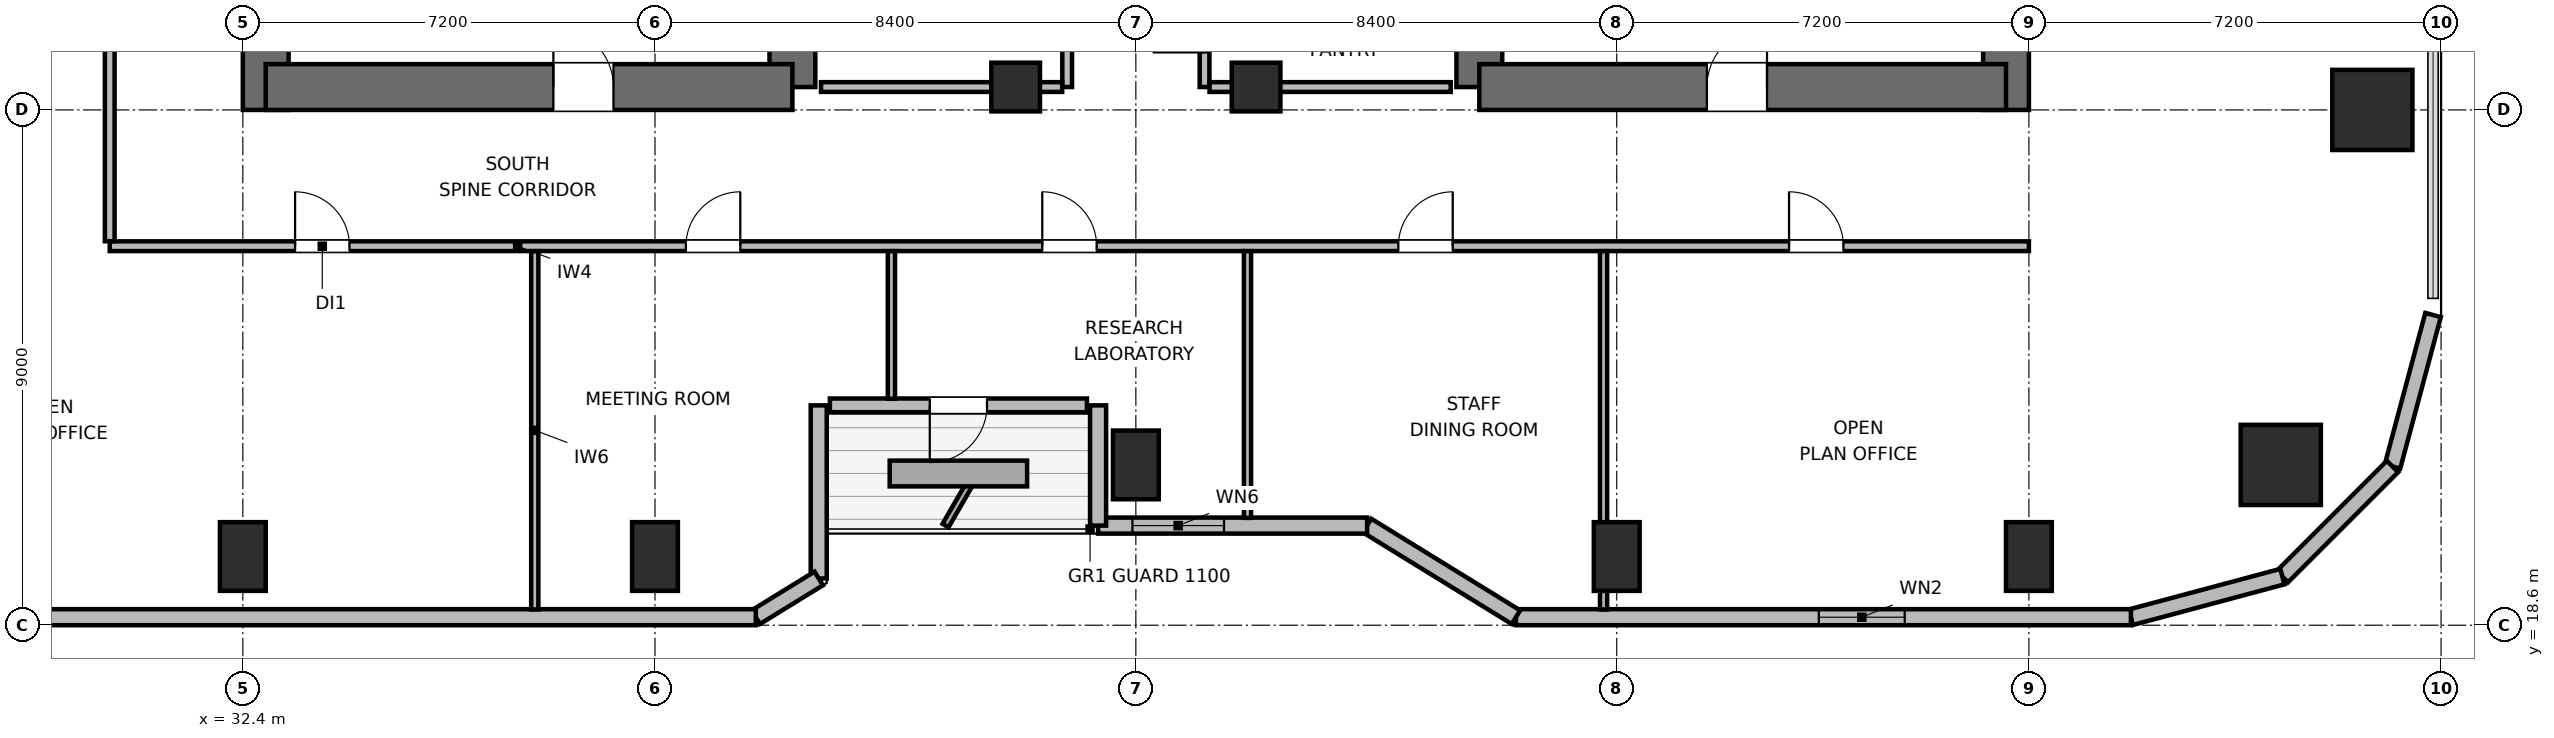
"""IFC4 building model, lengths in metres.
Left out: names, types, materials, properties, quantities, classifications, styles, units other than length and angle.
Written with IfcOpenShell. Run it as: python <this file> out.ifc"""

import sys

from ifc_helpers import new_model, si_unit, direction, frame, frame_2d, origin, origin_2d, place, context, subcontext, project, spatial, rectangle, circle, extrude, element, fill, save


model = new_model("IFC4")
c1 = context("Model", 3, precision=1e-05, world=origin(), true_north=direction((0.0, 1.0)))
c2 = subcontext(c1, "Body", "Model", "MODEL_VIEW")
j1 = project(units=[si_unit("LENGTHUNIT", "METRE"), si_unit("PLANEANGLEUNIT", "RADIAN")], contexts=[c1])
p1 = place(None, origin())
s1 = spatial("IfcSite", under=j1, at=p1, CompositionType="ELEMENT")
p2 = place(p1, origin())
s2 = spatial("IfcBuilding", under=s1, at=p2, CompositionType="ELEMENT")
p3 = place(p2, frame((0.0, 0.0, 150.6)))
s3 = spatial("IfcBuildingStorey", under=s2, at=p3, CompositionType="ELEMENT", Elevation=150.6)
p4 = place(p3, frame((32.8, 27.6, 0.0), z_axis=(0.0, 0.0, 1.0), x_axis=(0.0, 1.0, 0.0)))
e1 = element("IfcWall", 1, at=p4, inside=s3, PredefinedType="SHEAR", context=c2, shape_type="SweptSolid", body=[
    extrude(rectangle(XDim=16.8, YDim=0.8, at=frame_2d((8.4, 0.0))), origin(), (0.0, 0.0, 1.0), 3.9),
])
p5 = place(p3, frame((42.0, 28.0, 0.0), z_axis=(0.0, 0.0, 1.0), x_axis=(0.0, 1.0, 0.0)))
e2 = element("IfcWall", 2, at=p5, inside=s3, PredefinedType="SHEAR", context=c2, shape_type="SweptSolid", body=[
    extrude(rectangle(XDim=6.4, YDim=0.8, at=frame_2d((3.2, 0.0))), origin(), (0.0, 0.0, 1.0), 3.9),
])
p6 = place(p3, frame((32.8, 28.0, 0.0), z_axis=(0.0, 0.0, 1.0), x_axis=(1.0, 0.0, 0.0)))
e3 = element("IfcWall", 3, at=p6, inside=s3, PredefinedType="SHEAR", context=c2, shape_type="SweptSolid", body=[
    extrude(rectangle(XDim=9.2, YDim=0.8, at=frame_2d((4.6, 0.0))), origin(), (0.0, 0.0, 1.0), 3.9),
])
p7 = place(p6, frame((5.025, 0.0, 0.0)))
e4 = element("IfcOpeningElement", 4, at=p7, cuts=e3, PredefinedType="OPENING", context=c2, shape_type="SweptSolid", body=[
    extrude(rectangle(XDim=1.05, YDim=2.04, at=frame_2d((0.525, 1.02))), frame((0.0, 0.41, 0.0), z_axis=(0.0, -1.0, 0.0), x_axis=(1.0, 0.0, 0.0)), (0.0, 0.0, 1.0), 0.82),
])
p8 = place(p3, frame((54.0, 28.0, 0.0), z_axis=(0.0, 0.0, 1.0), x_axis=(0.0, 1.0, 0.0)))
e5 = element("IfcWall", 5, at=p8, inside=s3, PredefinedType="SHEAR", context=c2, shape_type="SweptSolid", body=[
    extrude(rectangle(XDim=7.8, YDim=0.8, at=frame_2d((3.9, 0.0))), origin(), (0.0, 0.0, 1.0), 3.9),
])
p9 = place(p3, frame((63.2, 27.6, 0.0), z_axis=(0.0, 0.0, 1.0), x_axis=(0.0, 1.0, 0.0)))
e6 = element("IfcWall", 6, at=p9, inside=s3, PredefinedType="SHEAR", context=c2, shape_type="SweptSolid", body=[
    extrude(rectangle(XDim=16.8, YDim=0.8, at=frame_2d((8.4, 0.0))), origin(), (0.0, 0.0, 1.0), 3.9),
])
p10 = place(p3, frame((54.0, 28.0, 0.0), z_axis=(0.0, 0.0, 1.0), x_axis=(1.0, 0.0, 0.0)))
e7 = element("IfcWall", 7, at=p10, inside=s3, PredefinedType="SHEAR", context=c2, shape_type="SweptSolid", body=[
    extrude(rectangle(XDim=9.2, YDim=0.8, at=frame_2d((4.6, 0.0))), origin(), (0.0, 0.0, 1.0), 3.9),
])
p11 = place(p10, frame((3.975, 0.0, 0.0)))
e8 = element("IfcOpeningElement", 8, at=p11, cuts=e7, PredefinedType="OPENING", context=c2, shape_type="SweptSolid", body=[
    extrude(rectangle(XDim=1.05, YDim=2.04, at=frame_2d((0.525, 1.02))), frame((0.0, 0.41, 0.0), z_axis=(0.0, -1.0, 0.0), x_axis=(1.0, 0.0, 0.0)), (0.0, 0.0, 1.0), 0.82),
])
p12 = place(p3, frame((68.0, 21.4, 0.0), z_axis=(0.0, 0.0, 1.0), x_axis=(1.0, 0.0, 0.0)))
e9 = element("IfcColumn", 9, at=p12, inside=s3, PredefinedType="COLUMN", context=c2, shape_type="SweptSolid", body=[
    extrude(circle(Radius=0.7, at=origin_2d()), origin(), (0.0, 0.0, 1.0), 3.9),
])
for number, where, z_axis, x_axis in (
    (10, (32.4, 19.8, 0.0), (0.0, 0.0, 1.0), (1.0, 0.0, 0.0)),
    (11, (39.6, 19.8, 0.0), (0.0, 0.0, 1.0), (1.0, 0.0, 0.0)),
    (12, (48.0, 21.4, 0.0), (0.0, 0.0, 1.0), (1.0, 0.0, 0.0)),
    (13, (56.4, 19.8, 0.0), (0.0, 0.0, 1.0), (1.0, 0.0, 0.0)),
    (14, (63.6, 19.8, 0.0), (0.0, 0.0, 1.0), (1.0, 0.0, 0.0)),
):
    element("IfcColumn", number, at=place(p3, frame(where, z_axis=z_axis, x_axis=x_axis)), inside=s3, PredefinedType="COLUMN", context=c2, shape_type="SweptSolid", body=[
        extrude(rectangle(XDim=0.8, YDim=1.2, at=origin_2d()), origin(), (0.0, 0.0, 1.0), 3.9),
    ])
p13 = place(p3, frame((69.6, 27.6, 0.0), z_axis=(0.0, 0.0, 1.0), x_axis=(1.0, 0.0, 0.0)))
e15 = element("IfcColumn", 15, at=p13, inside=s3, PredefinedType="COLUMN", context=c2, shape_type="SweptSolid", body=[
    extrude(rectangle(XDim=1.4, YDim=1.4, at=origin_2d()), origin(), (0.0, 0.0, 1.0), 3.9),
])
for number, where, z_axis, x_axis in (
    (16, (45.9, 28.0, 0.0), (0.0, 0.0, 1.0), (1.0, 0.0, 0.0)),
    (17, (50.1, 28.0, 0.0), (0.0, 0.0, 1.0), (1.0, 0.0, 0.0)),
):
    element("IfcColumn", number, at=place(p3, frame(where, z_axis=z_axis, x_axis=x_axis)), inside=s3, PredefinedType="COLUMN", context=c2, shape_type="SweptSolid", body=[
        extrude(rectangle(XDim=0.85, YDim=0.85, at=origin_2d()), origin(), (0.0, 0.0, 1.0), 3.9),
    ])
p14 = place(p3, frame((70.66, 24.018, 0.0), z_axis=(0.0, 0.0, 1.0), x_axis=(-0.258672222976, -0.9659651552, 0.0)))
e18 = element("IfcWall", 18, at=p14, inside=s3, PredefinedType="SOLIDWALL", context=c2, shape_type="SweptSolid", body=[
    extrude(rectangle(XDim=2.739, YDim=0.28, at=frame_2d((1.37, 0.0))), origin(), (0.0, 0.0, 1.0), 3.68),
])
p15 = place(p3, frame((69.951, 21.373, 0.0), z_axis=(0.0, 0.0, 1.0), x_axis=(-0.707061915429, -0.707151644098, 0.0)))
e19 = element("IfcWall", 19, at=p15, inside=s3, PredefinedType="SOLIDWALL", context=c2, shape_type="SweptSolid", body=[
    extrude(rectangle(XDim=2.721, YDim=0.28, at=frame_2d((1.36, 0.0))), origin(), (0.0, 0.0, 1.0), 3.68),
])
p16 = place(p3, frame((68.028, 19.448, 0.0), z_axis=(0.0, 0.0, 1.0), x_axis=(-0.965971118627, -0.258649952598, 0.0)))
e20 = element("IfcWall", 20, at=p16, inside=s3, PredefinedType="SOLIDWALL", context=c2, shape_type="SweptSolid", body=[
    extrude(rectangle(XDim=2.739, YDim=0.28, at=frame_2d((1.37, 0.0))), origin(), (0.0, 0.0, 1.0), 3.68),
])
p17 = place(p3, frame((65.382, 18.74, 0.0), z_axis=(0.0, 0.0, 1.0), x_axis=(-1.0, 0.0, 0.0)))
e21 = element("IfcWall", 21, at=p17, inside=s3, PredefinedType="SOLIDWALL", context=c2, shape_type="SweptSolid", body=[
    extrude(rectangle(XDim=10.742, YDim=0.28, at=frame_2d((5.371, 0.0))), origin(), (0.0, 0.0, 1.0), 3.68),
])
p18 = place(p17, frame((3.951, 0.0, 0.85)))
e22 = element("IfcOpeningElement", 22, at=p18, cuts=e21, PredefinedType="OPENING", context=c2, shape_type="SweptSolid", body=[
    extrude(rectangle(XDim=1.5, YDim=1.1, at=frame_2d((0.75, 0.55))), frame((0.0, 0.15, 0.0), z_axis=(0.0, -1.0, 0.0), x_axis=(1.0, 0.0, 0.0)), (0.0, 0.0, 1.0), 0.3),
])
p19 = place(p3, frame((54.64, 18.74, 0.0), z_axis=(0.0, 0.0, 1.0), x_axis=(-0.851652825334, 0.524106349037, 0.0)))
e23 = element("IfcWall", 23, at=p19, inside=s3, PredefinedType="SOLIDWALL", context=c2, shape_type="SweptSolid", body=[
    extrude(rectangle(XDim=3.053, YDim=0.28, at=frame_2d((1.526, 0.0))), origin(), (0.0, 0.0, 1.0), 2.265),
])
p20 = place(p3, frame((52.04, 20.34, 0.0), z_axis=(0.0, 0.0, 1.0), x_axis=(-1.0, 0.0, 0.0)))
e24 = element("IfcWall", 24, at=p20, inside=s3, PredefinedType="SOLIDWALL", context=c2, shape_type="SweptSolid", body=[
    extrude(rectangle(XDim=4.699, YDim=0.28, at=frame_2d((2.35, 0.0))), origin(), (0.0, 0.0, 1.0), 2.265),
])
p21 = place(p20, frame((2.5, 0.0, 0.85)))
e25 = element("IfcOpeningElement", 25, at=p21, cuts=e24, PredefinedType="OPENING", context=c2, shape_type="SweptSolid", body=[
    extrude(rectangle(XDim=1.6, YDim=1.0, at=frame_2d((0.8, 0.5))), frame((0.0, 0.15, 0.0), z_axis=(0.0, -1.0, 0.0), x_axis=(1.0, 0.0, 0.0)), (0.0, 0.0, 1.0), 0.3),
])
p22 = place(p3, frame((47.34, 20.34, 0.0), z_axis=(0.0, 0.0, 1.0), x_axis=(0.0, 1.0, 0.0)))
e26 = element("IfcWall", 26, at=p22, inside=s3, PredefinedType="SOLIDWALL", context=c2, shape_type="SweptSolid", body=[
    extrude(rectangle(XDim=2.1, YDim=0.28, at=frame_2d((1.05, 0.0))), origin(), (0.0, 0.0, 1.0), 2.265),
])
p23 = place(p3, frame((47.145, 22.44, 0.0), z_axis=(0.0, 0.0, 1.0), x_axis=(-1.0, 0.0, 0.0)))
e27 = element("IfcWall", 27, at=p23, inside=s3, PredefinedType="SOLIDWALL", context=c2, shape_type="SweptSolid", body=[
    extrude(rectangle(XDim=4.49, YDim=0.24, at=frame_2d((2.245, 0.0))), origin(), (0.0, 0.0, 1.0), 2.215),
])
p24 = place(p23, frame((1.745, 0.0, 0.0)))
e28 = element("IfcOpeningElement", 28, at=p24, cuts=e27, PredefinedType="OPENING", context=c2, shape_type="SweptSolid", body=[
    extrude(rectangle(XDim=1.0, YDim=2.02, at=frame_2d((0.5, 1.01))), frame((0.0, 0.13, 0.0), z_axis=(0.0, -1.0, 0.0), x_axis=(1.0, 0.0, 0.0)), (0.0, 0.0, 1.0), 0.26),
])
p25 = place(p3, frame((42.46, 22.44, 0.0), z_axis=(0.0, 0.0, 1.0), x_axis=(0.0, -1.0, 0.0)))
e29 = element("IfcWall", 29, at=p25, inside=s3, PredefinedType="SOLIDWALL", context=c2, shape_type="SweptSolid", body=[
    extrude(rectangle(XDim=3.024, YDim=0.28, at=frame_2d((1.512, 0.0))), origin(), (0.0, 0.0, 1.0), 2.265),
])
p26 = place(p3, frame((42.46, 19.416, 0.0), z_axis=(0.0, 0.0, 1.0), x_axis=(-0.851801140441, -0.523865266212, 0.0)))
e30 = element("IfcWall", 30, at=p26, inside=s3, PredefinedType="SOLIDWALL", context=c2, shape_type="SweptSolid", body=[
    extrude(rectangle(XDim=1.291, YDim=0.28, at=frame_2d((0.646, 0.0))), origin(), (0.0, 0.0, 1.0), 3.68),
])
p27 = place(p3, frame((41.36, 18.74, 0.0), z_axis=(0.0, 0.0, 1.0), x_axis=(-1.0, 0.0, 0.0)))
e31 = element("IfcWall", 31, at=p27, inside=s3, PredefinedType="SOLIDWALL", context=c2, shape_type="SweptSolid", body=[
    extrude(rectangle(XDim=17.942, YDim=0.28, at=frame_2d((8.971, 0.0))), origin(), (0.0, 0.0, 1.0), 3.68),
])
p28 = place(p3, frame((46.8, 28.0, 0.0), z_axis=(0.0, 0.0, 1.0), x_axis=(0.0, 1.0, 0.0)))
e32 = element("IfcWall", 32, at=p28, inside=s3, PredefinedType="PARTITIONING", context=c2, shape_type="SweptSolid", body=[
    extrude(rectangle(XDim=4.5, YDim=0.17, at=frame_2d((2.25, 0.0))), origin(), (0.0, 0.0, 1.0), 3.68),
])
p29 = place(p28, frame((1.8, 0.0, 0.0)))
e33 = element("IfcOpeningElement", 33, at=p29, cuts=e32, PredefinedType="OPENING", context=c2, shape_type="SweptSolid", body=[
    extrude(rectangle(XDim=0.9, YDim=2.02, at=frame_2d((0.45, 1.01))), frame((0.0, 0.095, 0.0), z_axis=(0.0, -1.0, 0.0), x_axis=(1.0, 0.0, 0.0)), (0.0, 0.0, 1.0), 0.19),
])
p30 = place(p3, frame((42.5, 28.0, 0.0), z_axis=(0.0, 0.0, 1.0), x_axis=(1.0, 0.0, 0.0)))
e34 = element("IfcWall", 34, at=p30, inside=s3, PredefinedType="PARTITIONING", context=c2, shape_type="SweptSolid", body=[
    extrude(rectangle(XDim=4.213, YDim=0.17, at=frame_2d((2.106, 0.0))), origin(), (0.0, 0.0, 1.0), 2.565),
])
p31 = place(p3, frame((49.2, 28.0, 0.0), z_axis=(0.0, 0.0, 1.0), x_axis=(0.0, 1.0, 0.0)))
e35 = element("IfcWall", 35, at=p31, inside=s3, PredefinedType="PARTITIONING", context=c2, shape_type="SweptSolid", body=[
    extrude(rectangle(XDim=4.5, YDim=0.17, at=frame_2d((2.25, 0.0))), origin(), (0.0, 0.0, 1.0), 3.68),
])
p32 = place(p31, frame((0.605, 0.0, 0.0)))
e36 = element("IfcOpeningElement", 36, at=p32, cuts=e35, PredefinedType="OPENING", context=c2, shape_type="SweptSolid", body=[
    extrude(rectangle(XDim=0.9, YDim=2.02, at=frame_2d((0.45, 1.01))), frame((0.0, 0.095, 0.0), z_axis=(0.0, -1.0, 0.0), x_axis=(1.0, 0.0, 0.0)), (0.0, 0.0, 1.0), 0.19),
])
p33 = place(p31, frame((2.655, 0.0, 0.0)))
e37 = element("IfcOpeningElement", 37, at=p33, cuts=e35, PredefinedType="OPENING", context=c2, shape_type="SweptSolid", body=[
    extrude(rectangle(XDim=0.9, YDim=2.02, at=frame_2d((0.45, 1.01))), frame((0.0, 0.095, 0.0), z_axis=(0.0, -1.0, 0.0), x_axis=(1.0, 0.0, 0.0)), (0.0, 0.0, 1.0), 0.19),
])
p34 = place(p3, frame((49.287, 28.0, 0.0), z_axis=(0.0, 0.0, 1.0), x_axis=(1.0, 0.0, 0.0)))
e38 = element("IfcWall", 38, at=p34, inside=s3, PredefinedType="PARTITIONING", context=c2, shape_type="SweptSolid", body=[
    extrude(rectangle(XDim=4.213, YDim=0.17, at=frame_2d((2.106, 0.0))), origin(), (0.0, 0.0, 1.0), 2.565),
])
p35 = place(p3, frame((30.075, 25.22, 0.0), z_axis=(0.0, 0.0, 1.0), x_axis=(1.0, 0.0, 0.0)))
e39 = element("IfcWall", 39, at=p35, inside=s3, PredefinedType="PARTITIONING", context=c2, shape_type="SweptSolid", body=[
    extrude(rectangle(XDim=33.525, YDim=0.17, at=frame_2d((16.763, 0.0))), origin(), (0.0, 0.0, 1.0), 3.68),
])
p36 = place(p35, frame((3.238, 0.0, 0.0)))
e40 = element("IfcOpeningElement", 40, at=p36, cuts=e39, PredefinedType="OPENING", context=c2, shape_type="SweptSolid", body=[
    extrude(rectangle(XDim=0.95, YDim=2.04, at=frame_2d((0.475, 1.02))), frame((0.0, 0.095, 0.0), z_axis=(0.0, -1.0, 0.0), x_axis=(1.0, 0.0, 0.0)), (0.0, 0.0, 1.0), 0.19),
])
p37 = place(p35, frame((10.065, 0.0, 0.0)))
e41 = element("IfcOpeningElement", 41, at=p37, cuts=e39, PredefinedType="OPENING", context=c2, shape_type="SweptSolid", body=[
    extrude(rectangle(XDim=0.95, YDim=2.04, at=frame_2d((0.475, 1.02))), frame((0.0, 0.095, 0.0), z_axis=(0.0, -1.0, 0.0), x_axis=(1.0, 0.0, 0.0)), (0.0, 0.0, 1.0), 0.19),
])
p38 = place(p35, frame((16.29, 0.0, 0.0)))
e42 = element("IfcOpeningElement", 42, at=p38, cuts=e39, PredefinedType="OPENING", context=c2, shape_type="SweptSolid", body=[
    extrude(rectangle(XDim=0.95, YDim=2.04, at=frame_2d((0.475, 1.02))), frame((0.0, 0.095, 0.0), z_axis=(0.0, -1.0, 0.0), x_axis=(1.0, 0.0, 0.0)), (0.0, 0.0, 1.0), 0.19),
])
p39 = place(p35, frame((22.51, 0.0, 0.0)))
e43 = element("IfcOpeningElement", 43, at=p39, cuts=e39, PredefinedType="OPENING", context=c2, shape_type="SweptSolid", body=[
    extrude(rectangle(XDim=0.95, YDim=2.04, at=frame_2d((0.475, 1.02))), frame((0.0, 0.095, 0.0), z_axis=(0.0, -1.0, 0.0), x_axis=(1.0, 0.0, 0.0)), (0.0, 0.0, 1.0), 0.19),
])
p40 = place(p35, frame((29.335, 0.0, 0.0)))
e44 = element("IfcOpeningElement", 44, at=p40, cuts=e39, PredefinedType="OPENING", context=c2, shape_type="SweptSolid", body=[
    extrude(rectangle(XDim=0.95, YDim=2.04, at=frame_2d((0.475, 1.02))), frame((0.0, 0.095, 0.0), z_axis=(0.0, -1.0, 0.0), x_axis=(1.0, 0.0, 0.0)), (0.0, 0.0, 1.0), 0.19),
])
p41 = place(p3, frame((30.075, 25.307, 0.0), z_axis=(0.0, 0.0, 1.0), x_axis=(0.0, 1.0, 0.0)))
e45 = element("IfcWall", 45, at=p41, inside=s3, PredefinedType="PARTITIONING", context=c2, shape_type="SweptSolid", body=[
    extrude(rectangle(XDim=9.093, YDim=0.17, at=frame_2d((4.546, 0.0))), origin(), (0.0, 0.0, 1.0), 3.68),
])
p42 = place(p41, frame((4.028, 0.0, 0.0)))
e46 = element("IfcOpeningElement", 46, at=p42, cuts=e45, PredefinedType="OPENING", context=c2, shape_type="SweptSolid", body=[
    extrude(rectangle(XDim=0.95, YDim=2.04, at=frame_2d((0.475, 1.02))), frame((0.0, 0.095, 0.0), z_axis=(0.0, -1.0, 0.0), x_axis=(1.0, 0.0, 0.0)), (0.0, 0.0, 1.0), 0.19),
])
p43 = place(p3, frame((37.5, 18.875, 0.0), z_axis=(0.0, 0.0, 1.0), x_axis=(0.0, 1.0, 0.0)))
e47 = element("IfcWall", 47, at=p43, inside=s3, PredefinedType="PARTITIONING", context=c2, shape_type="SweptSolid", body=[
    extrude(rectangle(XDim=6.258, YDim=0.125, at=frame_2d((3.129, 0.0))), origin(), (0.0, 0.0, 1.0), 3.68),
])
p44 = place(p3, frame((43.73, 22.555, 0.0), z_axis=(0.0, 0.0, 1.0), x_axis=(0.0, 1.0, 0.0)))
e48 = element("IfcWall", 48, at=p44, inside=s3, PredefinedType="PARTITIONING", context=c2, shape_type="SweptSolid", body=[
    extrude(rectangle(XDim=2.578, YDim=0.125, at=frame_2d((1.289, 0.0))), origin(), (0.0, 0.0, 1.0), 3.043),
])
p45 = place(p3, frame((49.95, 20.475, 0.0), z_axis=(0.0, 0.0, 1.0), x_axis=(0.0, 1.0, 0.0)))
e49 = element("IfcWall", 49, at=p45, inside=s3, PredefinedType="PARTITIONING", context=c2, shape_type="SweptSolid", body=[
    extrude(rectangle(XDim=4.658, YDim=0.125, at=frame_2d((2.329, 0.0))), origin(), (0.0, 0.0, 1.0), 3.68),
])
p46 = place(p3, frame((56.17, 18.875, 0.0), z_axis=(0.0, 0.0, 1.0), x_axis=(0.0, 1.0, 0.0)))
e50 = element("IfcWall", 50, at=p46, inside=s3, PredefinedType="PARTITIONING", context=c2, shape_type="SweptSolid", body=[
    extrude(rectangle(XDim=6.258, YDim=0.125, at=frame_2d((3.129, 0.0))), origin(), (0.0, 0.0, 1.0), 3.043),
])
p47 = place(p18, origin())
e51 = element("IfcWindow", 51, at=p47, inside=s3, PartitioningType="SINGLE_PANEL", PredefinedType="WINDOW", context=c2, shape_type="SweptSolid", body=[
    extrude(rectangle(XDim=1.5, YDim=1.1, at=frame_2d((0.75, 0.55))), frame((0.0, 0.03, 0.0), z_axis=(0.0, -1.0, 0.0), x_axis=(1.0, 0.0, 0.0)), (0.0, 0.0, 1.0), 0.06),
])
fill(e22, e51)
p48 = place(p21, origin())
e52 = element("IfcWindow", 52, at=p48, inside=s3, PartitioningType="SINGLE_PANEL", PredefinedType="WINDOW", context=c2, shape_type="SweptSolid", body=[
    extrude(rectangle(XDim=1.6, YDim=1.0, at=frame_2d((0.8, 0.5))), frame((0.0, 0.03, 0.0), z_axis=(0.0, -1.0, 0.0), x_axis=(1.0, 0.0, 0.0)), (0.0, 0.0, 1.0), 0.06),
])
fill(e25, e52)
p49 = place(p24, origin())
e53 = element("IfcDoor", 53, at=p49, inside=s3, OperationType="SINGLE_SWING_RIGHT", PredefinedType="DOOR", context=c2, shape_type="SweptSolid", body=[
    extrude(rectangle(XDim=1.0, YDim=2.02, at=frame_2d((0.5, 1.01))), frame((0.0, 0.025, 0.0), z_axis=(0.0, -1.0, 0.0), x_axis=(1.0, 0.0, 0.0)), (0.0, 0.0, 1.0), 0.05),
])
fill(e28, e53)
p50 = place(p7, origin())
e54 = element("IfcDoor", 54, at=p50, inside=s3, OperationType="SINGLE_SWING_LEFT", PredefinedType="DOOR", context=c2, shape_type="SweptSolid", body=[
    extrude(rectangle(XDim=1.05, YDim=2.04, at=frame_2d((0.525, 1.02))), frame((0.0, 0.025, 0.0), z_axis=(0.0, -1.0, 0.0), x_axis=(1.0, 0.0, 0.0)), (0.0, 0.0, 1.0), 0.05),
])
fill(e4, e54)
p51 = place(p11, origin())
e55 = element("IfcDoor", 55, at=p51, inside=s3, OperationType="SINGLE_SWING_RIGHT", PredefinedType="DOOR", context=c2, shape_type="SweptSolid", body=[
    extrude(rectangle(XDim=1.05, YDim=2.04, at=frame_2d((0.525, 1.02))), frame((0.0, 0.025, 0.0), z_axis=(0.0, -1.0, 0.0), x_axis=(1.0, 0.0, 0.0)), (0.0, 0.0, 1.0), 0.05),
])
fill(e8, e55)
p52 = place(p36, origin())
e56 = element("IfcDoor", 56, at=p52, inside=s3, OperationType="SINGLE_SWING_LEFT", PredefinedType="DOOR", context=c2, shape_type="SweptSolid", body=[
    extrude(rectangle(XDim=0.95, YDim=2.04, at=frame_2d((0.475, 1.02))), frame((0.0, 0.025, 0.0), z_axis=(0.0, -1.0, 0.0), x_axis=(1.0, 0.0, 0.0)), (0.0, 0.0, 1.0), 0.05),
])
fill(e40, e56)
p53 = place(p37, origin())
e57 = element("IfcDoor", 57, at=p53, inside=s3, OperationType="SINGLE_SWING_RIGHT", PredefinedType="DOOR", context=c2, shape_type="SweptSolid", body=[
    extrude(rectangle(XDim=0.95, YDim=2.04, at=frame_2d((0.475, 1.02))), frame((0.0, 0.025, 0.0), z_axis=(0.0, -1.0, 0.0), x_axis=(1.0, 0.0, 0.0)), (0.0, 0.0, 1.0), 0.05),
])
fill(e41, e57)
p54 = place(p38, origin())
e58 = element("IfcDoor", 58, at=p54, inside=s3, OperationType="SINGLE_SWING_LEFT", PredefinedType="DOOR", context=c2, shape_type="SweptSolid", body=[
    extrude(rectangle(XDim=0.95, YDim=2.04, at=frame_2d((0.475, 1.02))), frame((0.0, 0.025, 0.0), z_axis=(0.0, -1.0, 0.0), x_axis=(1.0, 0.0, 0.0)), (0.0, 0.0, 1.0), 0.05),
])
fill(e42, e58)
p55 = place(p39, origin())
e59 = element("IfcDoor", 59, at=p55, inside=s3, OperationType="SINGLE_SWING_RIGHT", PredefinedType="DOOR", context=c2, shape_type="SweptSolid", body=[
    extrude(rectangle(XDim=0.95, YDim=2.04, at=frame_2d((0.475, 1.02))), frame((0.0, 0.025, 0.0), z_axis=(0.0, -1.0, 0.0), x_axis=(1.0, 0.0, 0.0)), (0.0, 0.0, 1.0), 0.05),
])
fill(e43, e59)
p56 = place(p40, origin())
e60 = element("IfcDoor", 60, at=p56, inside=s3, OperationType="SINGLE_SWING_LEFT", PredefinedType="DOOR", context=c2, shape_type="SweptSolid", body=[
    extrude(rectangle(XDim=0.95, YDim=2.04, at=frame_2d((0.475, 1.02))), frame((0.0, 0.025, 0.0), z_axis=(0.0, -1.0, 0.0), x_axis=(1.0, 0.0, 0.0)), (0.0, 0.0, 1.0), 0.05),
])
fill(e44, e60)
save(model, sys.argv[1])
